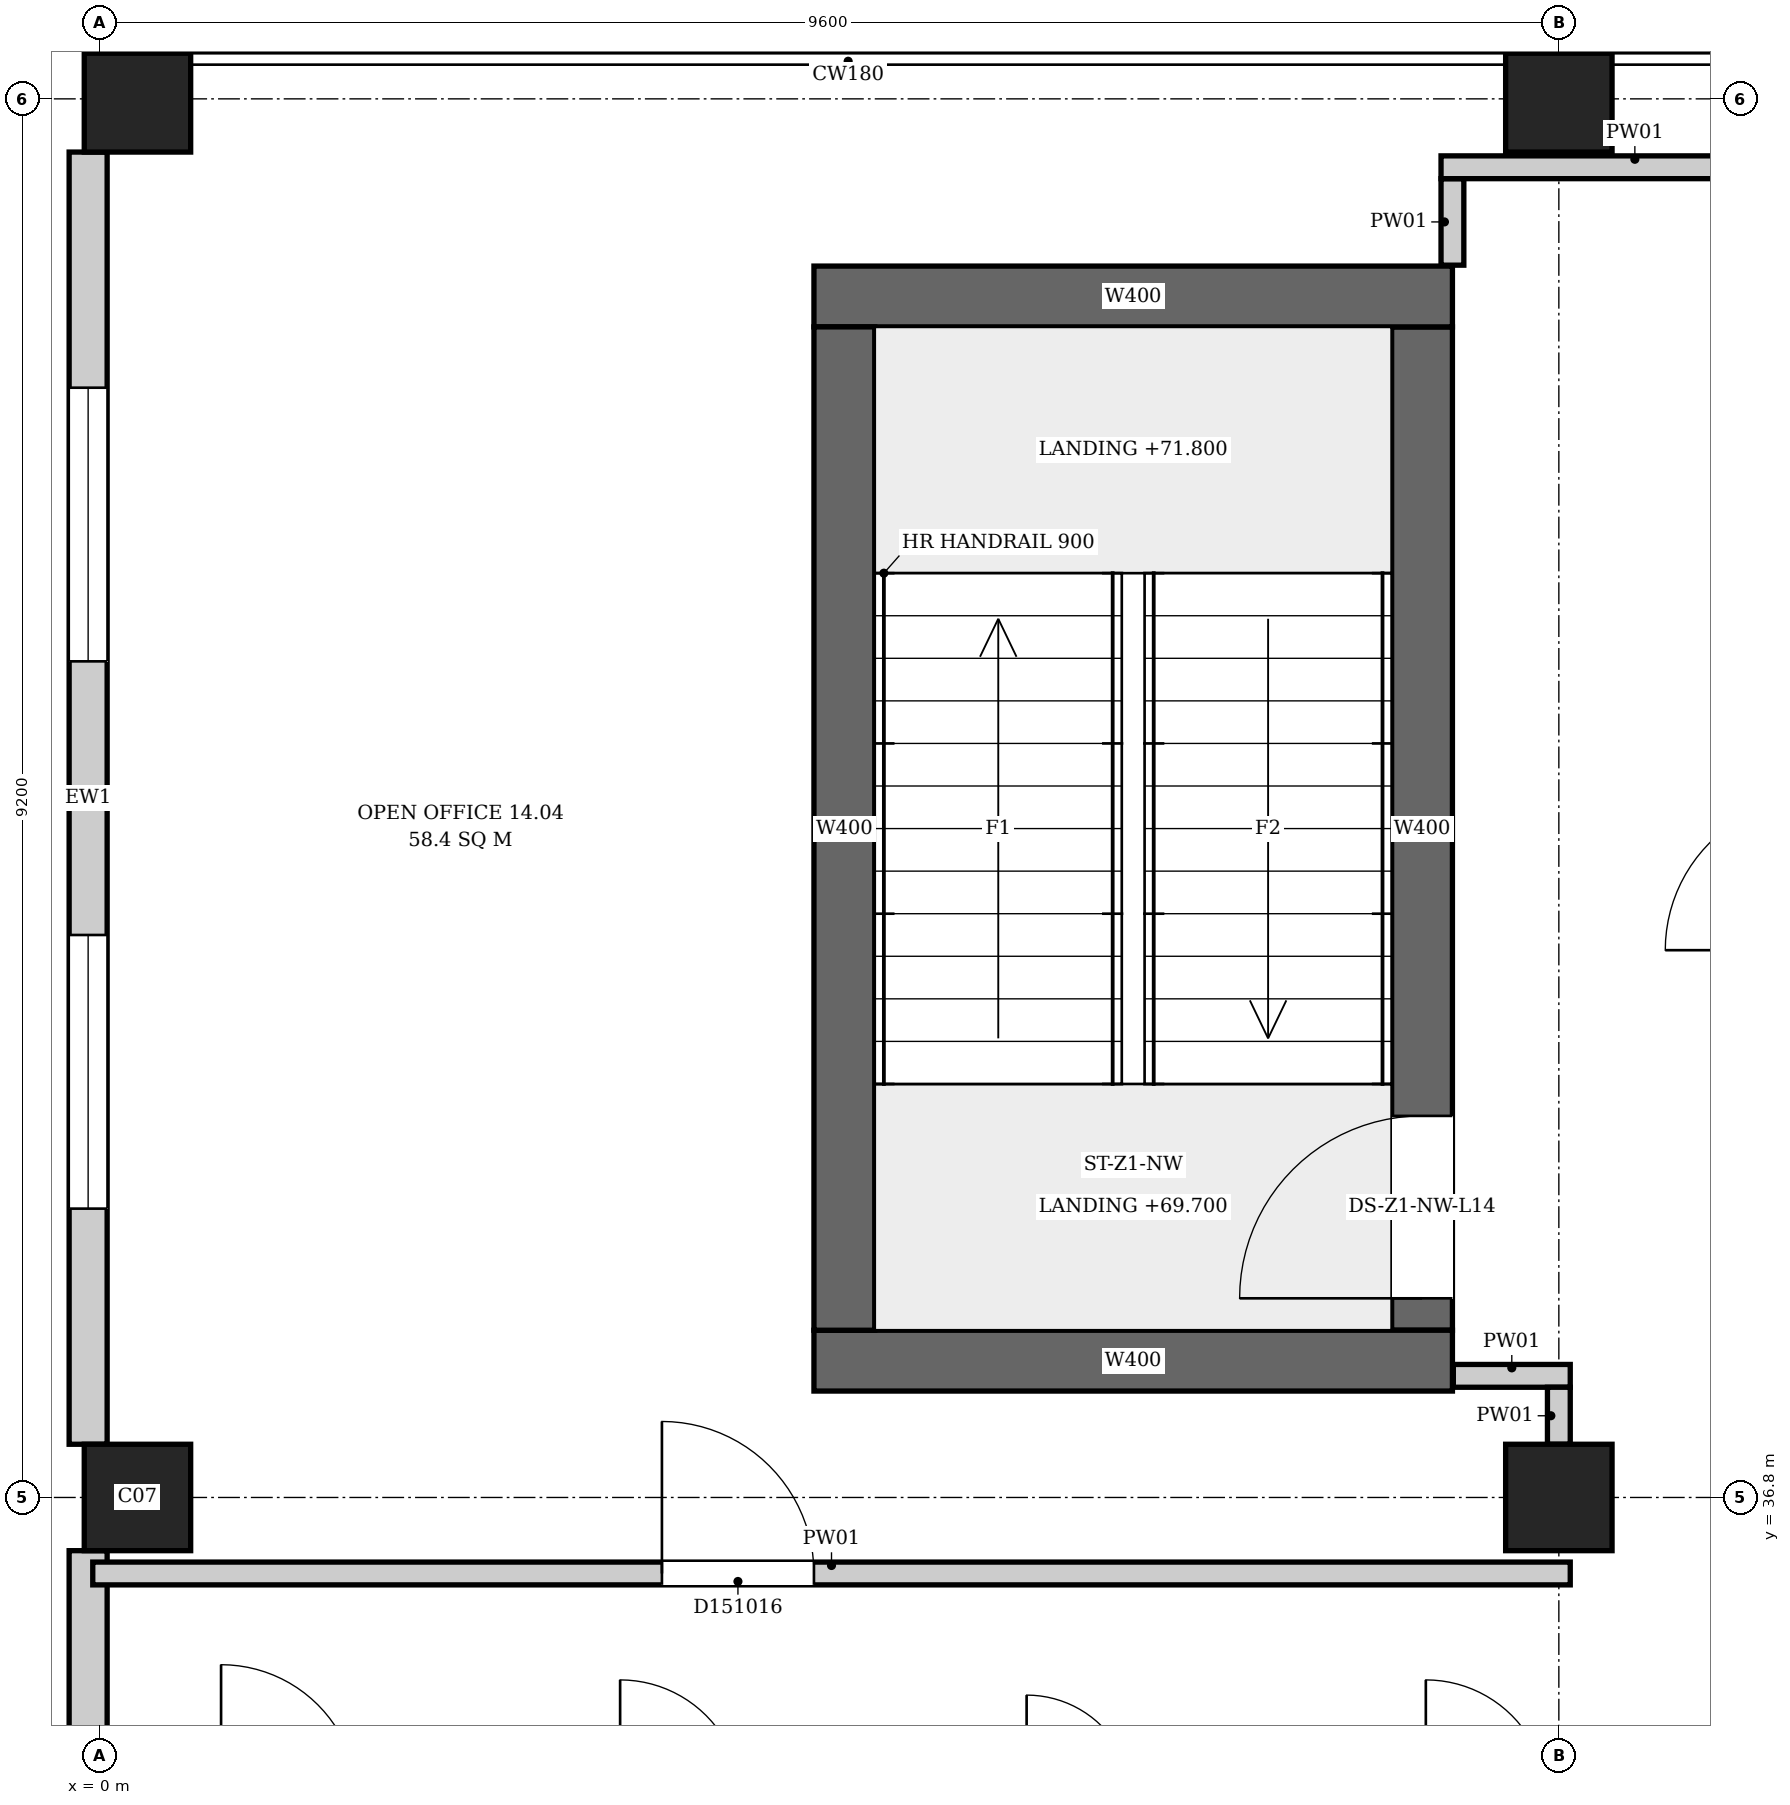
"""IFC4 building model, lengths in metres.
Left out: names, types, materials, properties, quantities, classifications, styles, units other than length and angle.
Written with IfcOpenShell. Run it as: python <this file> out.ifc"""

import sys

from ifc_helpers import new_model, si_unit, direction, frame, frame_2d, origin, origin_2d, place, context, subcontext, project, spatial, rectangle, extrude, element, fill, save


model = new_model("IFC4")
c1 = context("Model", 3, precision=1e-05, world=origin(), true_north=direction((0.0, 1.0)))
c2 = subcontext(c1, "Body", "Model", "MODEL_VIEW")
j1 = project(units=[si_unit("LENGTHUNIT", "METRE"), si_unit("PLANEANGLEUNIT", "RADIAN")], contexts=[c1])
p1 = place(None, origin())
s1 = spatial("IfcSite", under=j1, at=p1, CompositionType="ELEMENT")
p2 = place(p1, origin())
s2 = spatial("IfcBuilding", under=s1, at=p2, CompositionType="ELEMENT")
p3 = place(p2, frame((0.0, 0.0, 69.7)))
s3 = spatial("IfcBuildingStorey", under=s2, at=p3, CompositionType="ELEMENT", Elevation=69.7)
for number, where, z_axis, x_axis in (
    (1, (4.7, 37.7, 0.0), (0.0, 0.0, 1.0), (1.0, 0.0, 0.0)),
    (2, (4.7, 44.7, 0.0), (0.0, 0.0, 1.0), (1.0, 0.0, 0.0)),
):
    element("IfcWall", number, at=place(p3, frame(where, z_axis=z_axis, x_axis=x_axis)), inside=s3, PredefinedType="SHEAR", context=c2, shape_type="SweptSolid", body=[
        extrude(rectangle(XDim=4.2, YDim=0.4, at=frame_2d((2.1, 0.0))), origin(), (0.0, 0.0, 1.0), 4.2),
    ])
p4 = place(p3, frame((4.9, 37.9, 0.0), z_axis=(0.0, 0.0, 1.0), x_axis=(0.0, 1.0, 0.0)))
e3 = element("IfcWall", 3, at=p4, inside=s3, PredefinedType="SHEAR", context=c2, shape_type="SweptSolid", body=[
    extrude(rectangle(XDim=6.6, YDim=0.4, at=frame_2d((3.3, 0.0))), origin(), (0.0, 0.0, 1.0), 4.2),
])
p5 = place(p3, frame((8.7, 37.9, 0.0), z_axis=(0.0, 0.0, 1.0), x_axis=(0.0, 1.0, 0.0)))
e4 = element("IfcWall", 4, at=p5, inside=s3, PredefinedType="SHEAR", context=c2, shape_type="SweptSolid", body=[
    extrude(rectangle(XDim=6.6, YDim=0.4, at=frame_2d((3.3, 0.0))), origin(), (0.0, 0.0, 1.0), 4.2),
])
p6 = place(p5, frame((0.21, 0.0, 0.0)))
e5 = element("IfcOpeningElement", 5, at=p6, cuts=e4, PredefinedType="OPENING", context=c2, shape_type="SweptSolid", body=[
    extrude(rectangle(XDim=1.2, YDim=2.1, at=frame_2d((0.6, 1.05))), frame((0.0, 0.21, 0.0), z_axis=(0.0, -1.0, 0.0), x_axis=(1.0, 0.0, 0.0)), (0.0, 0.0, 1.0), 0.42),
])
for number, where, z_axis, x_axis in (
    (6, (0.25, 36.8, 0.0), (0.0, 0.0, 1.0), (1.0, 0.0, 0.0)),
    (7, (9.6, 36.8, 0.0), (0.0, 0.0, 1.0), (1.0, 0.0, 0.0)),
    (8, (0.25, 46.0, 0.0), (0.0, 0.0, 1.0), (1.0, 0.0, 0.0)),
    (9, (9.6, 46.0, 0.0), (0.0, 0.0, 1.0), (1.0, 0.0, 0.0)),
):
    element("IfcColumn", number, at=place(p3, frame(where, z_axis=z_axis, x_axis=x_axis)), inside=s3, PredefinedType="COLUMN", context=c2, shape_type="SweptSolid", body=[
        extrude(rectangle(XDim=0.7, YDim=0.7, at=origin_2d()), origin(), (0.0, 0.0, 1.0), 4.2),
    ])
p7 = place(p3, frame((-0.074, 36.45, 0.0), z_axis=(0.0, 0.0, 1.0), x_axis=(0.0, -1.0, 0.0)))
e10 = element("IfcWall", 10, at=p7, inside=s3, PredefinedType="ELEMENTEDWALL", context=c2, shape_type="SweptSolid", body=[
    extrude(rectangle(XDim=8.5, YDim=0.25, at=frame_2d((4.25, 0.0))), origin(), (0.0, 0.0, 1.0), 3.9),
])
p8 = place(p7, frame((5.15, 0.0, 0.9)))
e11 = element("IfcOpeningElement", 11, at=p8, cuts=e10, PredefinedType="OPENING", context=c2, shape_type="SweptSolid", body=[
    extrude(rectangle(XDim=1.8, YDim=2.6, at=frame_2d((0.9, 1.3))), frame((0.0, 0.135, 0.0), z_axis=(0.0, -1.0, 0.0), x_axis=(1.0, 0.0, 0.0)), (0.0, 0.0, 1.0), 0.27),
])
p9 = place(p7, frame((1.8, 0.0, 0.9)))
e12 = element("IfcOpeningElement", 12, at=p9, cuts=e10, PredefinedType="OPENING", context=c2, shape_type="SweptSolid", body=[
    extrude(rectangle(XDim=1.8, YDim=2.6, at=frame_2d((0.9, 1.3))), frame((0.0, 0.135, 0.0), z_axis=(0.0, -1.0, 0.0), x_axis=(1.0, 0.0, 0.0)), (0.0, 0.0, 1.0), 0.27),
])
p10 = place(p3, frame((-0.074, 45.65, 0.0), z_axis=(0.0, 0.0, 1.0), x_axis=(0.0, -1.0, 0.0)))
e13 = element("IfcWall", 13, at=p10, inside=s3, PredefinedType="ELEMENTEDWALL", context=c2, shape_type="SweptSolid", body=[
    extrude(rectangle(XDim=8.5, YDim=0.25, at=frame_2d((4.25, 0.0))), origin(), (0.0, 0.0, 1.0), 3.9),
])
p11 = place(p10, frame((5.15, 0.0, 0.9)))
e14 = element("IfcOpeningElement", 14, at=p11, cuts=e13, PredefinedType="OPENING", context=c2, shape_type="SweptSolid", body=[
    extrude(rectangle(XDim=1.8, YDim=2.6, at=frame_2d((0.9, 1.3))), frame((0.0, 0.135, 0.0), z_axis=(0.0, -1.0, 0.0), x_axis=(1.0, 0.0, 0.0)), (0.0, 0.0, 1.0), 0.27),
])
p12 = place(p10, frame((1.55, 0.0, 0.9)))
e15 = element("IfcOpeningElement", 15, at=p12, cuts=e13, PredefinedType="OPENING", context=c2, shape_type="SweptSolid", body=[
    extrude(rectangle(XDim=1.8, YDim=2.6, at=frame_2d((0.9, 1.3))), frame((0.0, 0.135, 0.0), z_axis=(0.0, -1.0, 0.0), x_axis=(1.0, 0.0, 0.0)), (0.0, 0.0, 1.0), 0.27),
])
p13 = place(p3, frame((-0.044, 36.3, 0.0), z_axis=(0.0, 0.0, 1.0), x_axis=(1.0, 0.0, 0.0)))
e16 = element("IfcWall", 16, at=p13, inside=s3, PredefinedType="PARTITIONING", context=c2, shape_type="SweptSolid", body=[
    extrude(rectangle(XDim=9.719, YDim=0.15, at=frame_2d((4.859, 0.0))), origin(), (0.0, 0.0, 1.0), 3.9),
])
p14 = place(p13, frame((3.744, 0.0, 0.0)))
e17 = element("IfcOpeningElement", 17, at=p14, cuts=e16, PredefinedType="OPENING", context=c2, shape_type="SweptSolid", body=[
    extrude(rectangle(XDim=1.0, YDim=2.1, at=frame_2d((0.5, 1.05))), frame((0.0, 0.085, 0.0), z_axis=(0.0, -1.0, 0.0), x_axis=(1.0, 0.0, 0.0)), (0.0, 0.0, 1.0), 0.17),
])
p15 = place(p3, frame((8.9, 44.906, 0.0), z_axis=(0.0, 0.0, 1.0), x_axis=(0.0, 1.0, 0.0)))
e18 = element("IfcWall", 18, at=p15, inside=s3, PredefinedType="PARTITIONING", context=c2, shape_type="SweptSolid", body=[
    extrude(rectangle(XDim=0.569, YDim=0.15, at=frame_2d((0.285, 0.0))), origin(), (0.0, 0.0, 1.0), 3.9),
])
p16 = place(p3, frame((8.825, 45.55, 0.0), z_axis=(0.0, 0.0, 1.0), x_axis=(1.0, 0.0, 0.0)))
e19 = element("IfcWall", 19, at=p16, inside=s3, PredefinedType="PARTITIONING", context=c2, shape_type="SweptSolid", body=[
    extrude(rectangle(XDim=2.55, YDim=0.15, at=frame_2d((1.275, 0.0))), origin(), (0.0, 0.0, 1.0), 3.9),
])
p17 = place(p3, frame((8.906, 37.6, 0.0), z_axis=(0.0, 0.0, 1.0), x_axis=(1.0, 0.0, 0.0)))
e20 = element("IfcWall", 20, at=p17, inside=s3, PredefinedType="PARTITIONING", context=c2, shape_type="SweptSolid", body=[
    extrude(rectangle(XDim=0.769, YDim=0.15, at=frame_2d((0.385, 0.0))), origin(), (0.0, 0.0, 1.0), 3.9),
])
p18 = place(p3, frame((9.6, 37.15, 0.0), z_axis=(0.0, 0.0, 1.0), x_axis=(0.0, 1.0, 0.0)))
e21 = element("IfcWall", 21, at=p18, inside=s3, PredefinedType="PARTITIONING", context=c2, shape_type="SweptSolid", body=[
    extrude(rectangle(XDim=0.375, YDim=0.15, at=frame_2d((0.188, 0.0))), origin(), (0.0, 0.0, 1.0), 3.9),
])
p19 = place(p11, origin())
e22 = element("IfcWindow", 22, at=p19, inside=s3, PartitioningType="SINGLE_PANEL", PredefinedType="WINDOW", context=c2, shape_type="SweptSolid", body=[
    extrude(rectangle(XDim=1.8, YDim=2.6, at=frame_2d((0.9, 1.3))), frame((0.0, 0.03, 0.0), z_axis=(0.0, -1.0, 0.0), x_axis=(1.0, 0.0, 0.0)), (0.0, 0.0, 1.0), 0.06),
])
fill(e14, e22)
p20 = place(p12, origin())
e23 = element("IfcWindow", 23, at=p20, inside=s3, PartitioningType="SINGLE_PANEL", PredefinedType="WINDOW", context=c2, shape_type="SweptSolid", body=[
    extrude(rectangle(XDim=1.8, YDim=2.6, at=frame_2d((0.9, 1.3))), frame((0.0, 0.03, 0.0), z_axis=(0.0, -1.0, 0.0), x_axis=(1.0, 0.0, 0.0)), (0.0, 0.0, 1.0), 0.06),
])
fill(e15, e23)
p21 = place(p6, origin())
e24 = element("IfcDoor", 24, at=p21, inside=s3, OperationType="SINGLE_SWING_RIGHT", PredefinedType="DOOR", context=c2, shape_type="SweptSolid", body=[
    extrude(rectangle(XDim=1.2, YDim=2.1, at=frame_2d((0.6, 1.05))), frame((0.0, 0.025, 0.0), z_axis=(0.0, -1.0, 0.0), x_axis=(1.0, 0.0, 0.0)), (0.0, 0.0, 1.0), 0.05),
])
fill(e5, e24)
p22 = place(p14, origin())
e25 = element("IfcDoor", 25, at=p22, inside=s3, OperationType="SINGLE_SWING_RIGHT", PredefinedType="DOOR", context=c2, shape_type="SweptSolid", body=[
    extrude(rectangle(XDim=1.0, YDim=2.1, at=frame_2d((0.5, 1.05))), frame((0.0, 0.025, 0.0), z_axis=(0.0, -1.0, 0.0), x_axis=(1.0, 0.0, 0.0)), (0.0, 0.0, 1.0), 0.05),
])
fill(e17, e25)
save(model, sys.argv[1])
